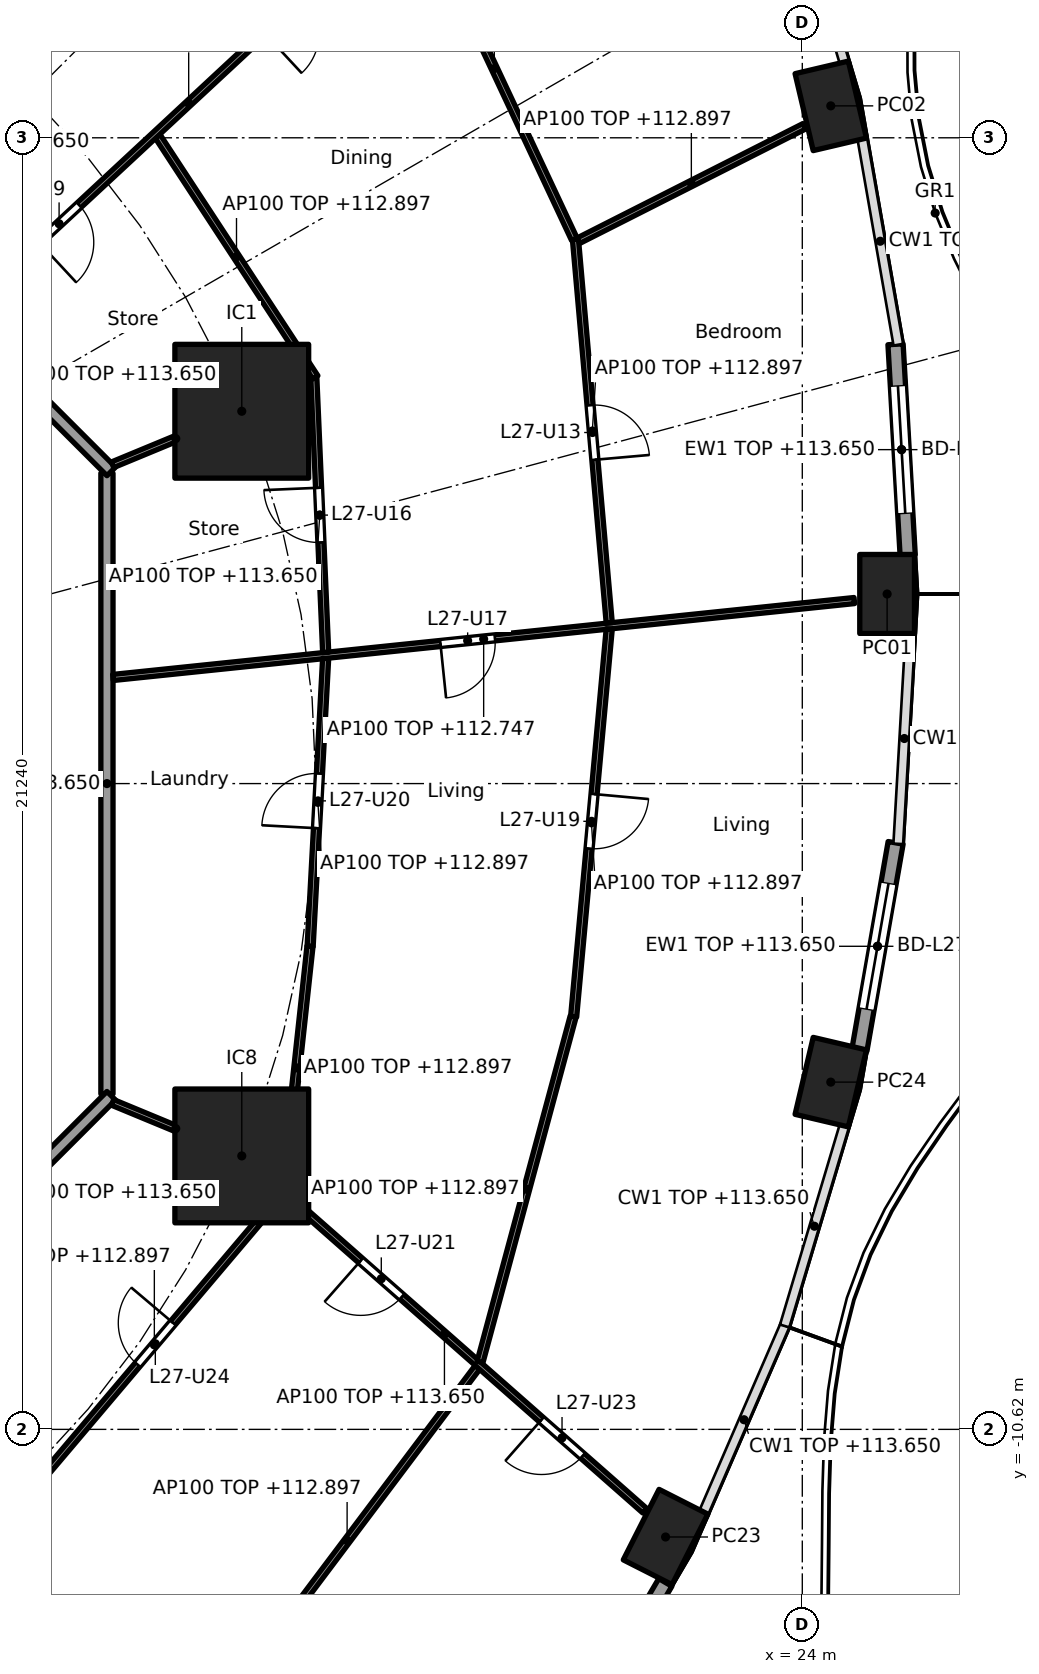
"""IFC4 building model, lengths in metres.
Left out: names, types, materials, properties, quantities, classifications, styles, units other than length and angle.
Written with IfcOpenShell. Run it as: python <this file> out.ifc"""

import sys

from ifc_helpers import new_model, si_unit, direction, frame, frame_2d, origin, origin_2d, place, context, subcontext, project, spatial, rectangle, hollow_rectangle, extrude, element, fill, save


model = new_model("IFC4")
c1 = context("Model", 3, precision=1e-05, world=origin(), true_north=direction((0.0, 1.0)))
c2 = subcontext(c1, "Body", "Model", "MODEL_VIEW")
j1 = project(units=[si_unit("LENGTHUNIT", "METRE"), si_unit("PLANEANGLEUNIT", "RADIAN")], contexts=[c1])
p1 = place(None, origin())
s1 = spatial("IfcSite", under=j1, at=p1, CompositionType="ELEMENT")
p2 = place(p1, origin())
s2 = spatial("IfcBuilding", under=s1, at=p2, CompositionType="ELEMENT")
p3 = place(p2, frame((0.0, 0.0, 110.3)))
s3 = spatial("IfcBuildingStorey", under=s2, at=p3, CompositionType="ELEMENT", Elevation=110.3)
for number, where, z_axis, x_axis in (
    (1, (25.395, 3.118, 0.0), (0.0, 0.0, 1.0), (0.0, 1.0, 0.0)),
    (2, (24.468, 11.145, 0.0), (0.0, 0.0, 1.0), (-0.229, 0.973, 0.0)),
    (3, (21.751, -12.39, 0.0), (0.0, 0.0, 1.0), (0.452, 0.892, 0.0)),
    (4, (24.468, -4.91, 0.0), (0.0, 0.0, 1.0), (0.229, 0.973, 0.0)),
):
    element("IfcColumn", number, at=place(p3, frame(where, z_axis=z_axis, x_axis=x_axis)), inside=s3, PredefinedType="COLUMN", context=c2, shape_type="SweptSolid", body=[
        extrude(hollow_rectangle(XDim=1.3, YDim=0.9, WallThickness=0.045, at=origin_2d()), origin(), (0.0, 0.0, 1.0), 3.7),
    ])
for number, where, z_axis, x_axis in (
    (5, (14.782, 6.123, 0.0), (0.0, 0.0, 1.0), (1.0, 0.0, 0.0)),
    (6, (14.782, -6.123, 0.0), (0.0, 0.0, 1.0), (1.0, 0.0, 0.0)),
):
    element("IfcColumn", number, at=place(p3, frame(where, z_axis=z_axis, x_axis=x_axis)), inside=s3, PredefinedType="COLUMN", context=c2, shape_type="SweptSolid", body=[
        extrude(rectangle(XDim=2.2, YDim=2.2, at=origin_2d()), origin(), (0.0, 0.0, 1.0), 3.7),
    ])
p4 = place(p3, frame((25.533, 7.224, 0.0), z_axis=(0.0, 0.0, 1.0), x_axis=(0.057546644052, -0.998342818754, 0.0)))
e7 = element("IfcWall", 7, at=p4, inside=s3, PredefinedType="SOLIDWALL", context=c2, shape_type="SweptSolid", body=[
    extrude(rectangle(XDim=3.47, YDim=0.25, at=frame_2d((1.735, 0.0))), origin(), (0.0, 0.0, 1.0), 3.35),
])
p5 = place(p4, frame((0.685, 0.0, 0.0)))
e8 = element("IfcOpeningElement", 8, at=p5, cuts=e7, PredefinedType="OPENING", context=c2, shape_type="SweptSolid", body=[
    extrude(rectangle(XDim=2.1, YDim=2.4, at=frame_2d((1.05, 1.2))), frame((0.0, 0.135, 0.0), z_axis=(0.0, -1.0, 0.0), x_axis=(1.0, 0.0, 0.0)), (0.0, 0.0, 1.0), 0.27),
])
p6 = place(p3, frame((21.748, -13.137, 0.0), z_axis=(0.0, 0.0, 1.0), x_axis=(-0.506297921217, -0.862358634775, 0.0)))
e9 = element("IfcWall", 9, at=p6, inside=s3, PredefinedType="SOLIDWALL", context=c2, shape_type="SweptSolid", body=[
    extrude(rectangle(XDim=3.325, YDim=0.25, at=frame_2d((1.662, 0.0))), origin(), (0.0, 0.0, 1.0), 3.35),
])
p7 = place(p6, frame((0.612, 0.0, 0.0)))
e10 = element("IfcOpeningElement", 10, at=p7, cuts=e9, PredefinedType="OPENING", context=c2, shape_type="SweptSolid", body=[
    extrude(rectangle(XDim=2.1, YDim=2.4, at=frame_2d((1.05, 1.2))), frame((0.0, 0.135, 0.0), z_axis=(0.0, -1.0, 0.0), x_axis=(1.0, 0.0, 0.0)), (0.0, 0.0, 1.0), 0.27),
])
p8 = place(p3, frame((25.535, -0.974, 0.0), z_axis=(0.0, 0.0, 1.0), x_axis=(-0.172164316671, -0.985068245385, 0.0)))
e11 = element("IfcWall", 11, at=p8, inside=s3, PredefinedType="SOLIDWALL", context=c2, shape_type="SweptSolid", body=[
    extrude(rectangle(XDim=3.454, YDim=0.25, at=frame_2d((1.727, 0.0))), origin(), (0.0, 0.0, 1.0), 3.35),
])
p9 = place(p8, frame((0.677, 0.0, 0.0)))
e12 = element("IfcOpeningElement", 12, at=p9, cuts=e11, PredefinedType="OPENING", context=c2, shape_type="SweptSolid", body=[
    extrude(rectangle(XDim=2.1, YDim=2.4, at=frame_2d((1.05, 1.2))), frame((0.0, 0.135, 0.0), z_axis=(0.0, -1.0, 0.0), x_axis=(1.0, 0.0, 0.0)), (0.0, 0.0, 1.0), 0.27),
])
p10 = place(p3, frame((12.565, -5.104, 0.0), z_axis=(0.0, 0.0, 1.0), x_axis=(0.0, 1.0, 0.0)))
e13 = element("IfcWall", 13, at=p10, inside=s3, PredefinedType="PARTITIONING", context=c2, shape_type="SweptSolid", body=[
    extrude(rectangle(XDim=10.209, YDim=0.2, at=frame_2d((5.104, 0.0))), origin(), (0.0, 0.0, 1.0), 3.35),
])
p11 = place(p3, frame((12.635, 5.134, 0.0), z_axis=(0.0, 0.0, 1.0), x_axis=(-0.707106781187, 0.707106781187, 0.0)))
e14 = element("IfcWall", 14, at=p11, inside=s3, PredefinedType="PARTITIONING", context=c2, shape_type="SweptSolid", body=[
    extrude(rectangle(XDim=10.609, YDim=0.2, at=frame_2d((5.305, 0.0))), origin(), (0.0, 0.0, 1.0), 3.35),
])
p12 = place(p11, frame((4.804, 0.0, 0.0)))
e15 = element("IfcOpeningElement", 15, at=p12, cuts=e14, PredefinedType="OPENING", context=c2, shape_type="SweptSolid", body=[
    extrude(rectangle(XDim=1.0, YDim=2.1, at=frame_2d((0.5, 1.05))), frame((0.0, 0.11, 0.0), z_axis=(0.0, -1.0, 0.0), x_axis=(1.0, 0.0, 0.0)), (0.0, 0.0, 1.0), 0.22),
])
p13 = place(p3, frame((5.275, -12.494, 0.0), z_axis=(0.0, 0.0, 1.0), x_axis=(0.707106781187, 0.707106781187, 0.0)))
e16 = element("IfcWall", 16, at=p13, inside=s3, PredefinedType="PARTITIONING", context=c2, shape_type="SweptSolid", body=[
    extrude(rectangle(XDim=10.409, YDim=0.2, at=frame_2d((5.205, 0.0))), origin(), (0.0, 0.0, 1.0), 3.35),
])
p14 = place(p3, frame((12.664, 1.745, 0.0), z_axis=(0.0, 0.0, 1.0), x_axis=(0.994662790212, 0.103179134358, 0.0)))
e17 = element("IfcWall", 17, at=p14, inside=s3, PredefinedType="PARTITIONING", context=c2, shape_type="SweptSolid", body=[
    extrude(rectangle(XDim=12.257, YDim=0.1, at=frame_2d((6.128, 0.0))), origin(), (0.0, 0.0, 1.0), 2.447),
])
p15 = place(p14, frame((5.414, 0.0, 0.0)))
e18 = element("IfcOpeningElement", 18, at=p15, cuts=e17, PredefinedType="OPENING", context=c2, shape_type="SweptSolid", body=[
    extrude(rectangle(XDim=0.9, YDim=2.1, at=frame_2d((0.45, 1.05))), frame((0.0, 0.06, 0.0), z_axis=(0.0, -1.0, 0.0), x_axis=(1.0, 0.0, 0.0)), (0.0, 0.0, 1.0), 0.12),
])
p16 = place(p3, frame((16.162, 2.158, 0.0), z_axis=(0.0, 0.0, 1.0), x_axis=(-0.043120653248, 0.999069872063, 0.0)))
e19 = element("IfcWall", 19, at=p16, inside=s3, PredefinedType="PARTITIONING", context=c2, shape_type="SweptSolid", body=[
    extrude(rectangle(XDim=4.518, YDim=0.1, at=frame_2d((2.259, 0.0))), origin(), (0.0, 0.0, 1.0), 3.35),
])
p17 = place(p16, frame((1.809, 0.0, 0.0)))
e20 = element("IfcOpeningElement", 20, at=p17, cuts=e19, PredefinedType="OPENING", context=c2, shape_type="SweptSolid", body=[
    extrude(rectangle(XDim=0.9, YDim=2.1, at=frame_2d((0.45, 1.05))), frame((0.0, 0.06, 0.0), z_axis=(0.0, -1.0, 0.0), x_axis=(1.0, 0.0, 0.0)), (0.0, 0.0, 1.0), 0.12),
])
p18 = place(p3, frame((16.161, 2.058, 0.0), z_axis=(0.0, 0.0, 1.0), x_axis=(-0.053696394729, -0.998557307916, 0.0)))
e21 = element("IfcWall", 21, at=p18, inside=s3, PredefinedType="PARTITIONING", context=c2, shape_type="SweptSolid", body=[
    extrude(rectangle(XDim=4.742, YDim=0.1, at=frame_2d((2.371, 0.0))), origin(), (0.0, 0.0, 1.0), 2.597),
])
p19 = place(p18, frame((1.896, 0.0, 0.0)))
e22 = element("IfcOpeningElement", 22, at=p19, cuts=e21, PredefinedType="OPENING", context=c2, shape_type="SweptSolid", body=[
    extrude(rectangle(XDim=0.9, YDim=2.1, at=frame_2d((0.45, 1.05))), frame((0.0, 0.06, 0.0), z_axis=(0.0, -1.0, 0.0), x_axis=(1.0, 0.0, 0.0)), (0.0, 0.0, 1.0), 0.12),
])
p20 = place(p3, frame((20.825, 2.642, 0.0), z_axis=(0.0, 0.0, 1.0), x_axis=(-0.08776338161, 0.996141349834, 0.0)))
e23 = element("IfcWall", 23, at=p20, inside=s3, PredefinedType="PARTITIONING", context=c2, shape_type="SweptSolid", body=[
    extrude(rectangle(XDim=6.337, YDim=0.1, at=frame_2d((3.168, 0.0))), origin(), (0.0, 0.0, 1.0), 2.597),
])
p21 = place(p20, frame((2.694, 0.0, 0.0)))
e24 = element("IfcOpeningElement", 24, at=p21, cuts=e23, PredefinedType="OPENING", context=c2, shape_type="SweptSolid", body=[
    extrude(rectangle(XDim=0.9, YDim=2.1, at=frame_2d((0.45, 1.05))), frame((0.0, 0.06, 0.0), z_axis=(0.0, -1.0, 0.0), x_axis=(1.0, 0.0, 0.0)), (0.0, 0.0, 1.0), 0.12),
])
p22 = place(p3, frame((20.825, 2.542, 0.0), z_axis=(0.0, 0.0, 1.0), x_axis=(-0.09140211812, -0.995814065377, 0.0)))
e25 = element("IfcWall", 25, at=p22, inside=s3, PredefinedType="PARTITIONING", context=c2, shape_type="SweptSolid", body=[
    extrude(rectangle(XDim=6.403, YDim=0.1, at=frame_2d((3.201, 0.0))), origin(), (0.0, 0.0, 1.0), 2.597),
])
p23 = place(p22, frame((2.726, 0.0, 0.0)))
e26 = element("IfcOpeningElement", 26, at=p23, cuts=e25, PredefinedType="OPENING", context=c2, shape_type="SweptSolid", body=[
    extrude(rectangle(XDim=0.9, YDim=2.1, at=frame_2d((0.45, 1.05))), frame((0.0, 0.06, 0.0), z_axis=(0.0, -1.0, 0.0), x_axis=(1.0, 0.0, 0.0)), (0.0, 0.0, 1.0), 0.12),
])
p24 = place(p3, frame((12.657, 5.243, 0.0), z_axis=(0.0, 0.0, 1.0), x_axis=(0.923864733477, 0.382719158442, 0.0)))
e27 = element("IfcWall", 27, at=p24, inside=s3, PredefinedType="PARTITIONING", context=c2, shape_type="SweptSolid", body=[
    extrude(rectangle(XDim=2.25, YDim=0.1, at=frame_2d((1.125, 0.0))), origin(), (0.0, 0.0, 1.0), 3.35),
])
p25 = place(p3, frame((15.992, 6.68, 0.0), z_axis=(0.0, 0.0, 1.0), x_axis=(-0.547472878942, 0.836823426311, 0.0)))
e28 = element("IfcWall", 28, at=p25, inside=s3, PredefinedType="PARTITIONING", context=c2, shape_type="SweptSolid", body=[
    extrude(rectangle(XDim=4.738, YDim=0.1, at=frame_2d((2.369, 0.0))), origin(), (0.0, 0.0, 1.0), 2.597),
])
p26 = place(p3, frame((20.318, 8.927, 0.0), z_axis=(0.0, 0.0, 1.0), x_axis=(0.892057836959, 0.451921249246, 0.0)))
e29 = element("IfcWall", 29, at=p26, inside=s3, PredefinedType="PARTITIONING", context=c2, shape_type="SweptSolid", body=[
    extrude(rectangle(XDim=4.164, YDim=0.1, at=frame_2d((2.082, 0.0))), origin(), (0.0, 0.0, 1.0), 2.597),
])
p27 = place(p3, frame((20.252, 8.95, 0.0), z_axis=(0.0, 0.0, 1.0), x_axis=(-0.424580052627, 0.90539040138, 0.0)))
e30 = element("IfcWall", 30, at=p27, inside=s3, PredefinedType="PARTITIONING", context=c2, shape_type="SweptSolid", body=[
    extrude(rectangle(XDim=6.204, YDim=0.1, at=frame_2d((3.102, 0.0))), origin(), (0.0, 0.0, 1.0), 2.597),
])
p28 = place(p3, frame((10.185, 7.726, 0.0), z_axis=(0.0, 0.0, 1.0), x_axis=(0.732598472978, 0.680661059112, 0.0)))
e31 = element("IfcWall", 31, at=p28, inside=s3, PredefinedType="PARTITIONING", context=c2, shape_type="SweptSolid", body=[
    extrude(rectangle(XDim=10.167, YDim=0.1, at=frame_2d((5.084, 0.0))), origin(), (0.0, 0.0, 1.0), 2.447),
])
p29 = place(p28, frame((1.725, 0.0, 0.0)))
e32 = element("IfcOpeningElement", 32, at=p29, cuts=e31, PredefinedType="OPENING", context=c2, shape_type="SweptSolid", body=[
    extrude(rectangle(XDim=0.9, YDim=2.1, at=frame_2d((0.45, 1.05))), frame((0.0, 0.06, 0.0), z_axis=(0.0, -1.0, 0.0), x_axis=(1.0, 0.0, 0.0)), (0.0, 0.0, 1.0), 0.12),
])
p30 = place(p28, frame((6.784, 0.0, 0.0)))
e33 = element("IfcOpeningElement", 33, at=p30, cuts=e31, PredefinedType="OPENING", context=c2, shape_type="SweptSolid", body=[
    extrude(rectangle(XDim=0.9, YDim=2.1, at=frame_2d((0.45, 1.05))), frame((0.0, 0.06, 0.0), z_axis=(0.0, -1.0, 0.0), x_axis=(1.0, 0.0, 0.0)), (0.0, 0.0, 1.0), 0.12),
])
p31 = place(p3, frame((7.713, 10.195, 0.0), z_axis=(0.0, 0.0, 1.0), x_axis=(0.552111071171, 0.833770571015, 0.0)))
e34 = element("IfcWall", 34, at=p31, inside=s3, PredefinedType="PARTITIONING", context=c2, shape_type="SweptSolid", body=[
    extrude(rectangle(XDim=17.208, YDim=0.1, at=frame_2d((8.604, 0.0))), origin(), (0.0, 0.0, 1.0), 2.447),
])
p32 = place(p31, frame((1.976, 0.0, 0.0)))
e35 = element("IfcOpeningElement", 35, at=p32, cuts=e34, PredefinedType="OPENING", context=c2, shape_type="SweptSolid", body=[
    extrude(rectangle(XDim=0.9, YDim=2.1, at=frame_2d((0.45, 1.05))), frame((0.0, 0.06, 0.0), z_axis=(0.0, -1.0, 0.0), x_axis=(1.0, 0.0, 0.0)), (0.0, 0.0, 1.0), 0.12),
])
p33 = place(p31, frame((7.611, 0.0, 0.0)))
e36 = element("IfcOpeningElement", 36, at=p33, cuts=e34, PredefinedType="OPENING", context=c2, shape_type="SweptSolid", body=[
    extrude(rectangle(XDim=0.9, YDim=2.1, at=frame_2d((0.45, 1.05))), frame((0.0, 0.06, 0.0), z_axis=(0.0, -1.0, 0.0), x_axis=(1.0, 0.0, 0.0)), (0.0, 0.0, 1.0), 0.12),
])
p34 = place(p31, frame((13.79, 0.0, 0.0)))
e37 = element("IfcOpeningElement", 37, at=p34, cuts=e34, PredefinedType="OPENING", context=c2, shape_type="SweptSolid", body=[
    extrude(rectangle(XDim=0.9, YDim=2.1, at=frame_2d((0.45, 1.05))), frame((0.0, 0.06, 0.0), z_axis=(0.0, -1.0, 0.0), x_axis=(1.0, 0.0, 0.0)), (0.0, 0.0, 1.0), 0.12),
])
p35 = place(p3, frame((11.255, -11.699, 0.0), z_axis=(0.0, 0.0, 1.0), x_axis=(0.64610637779, 0.763247370503, 0.0)))
e38 = element("IfcWall", 38, at=p35, inside=s3, PredefinedType="PARTITIONING", context=c2, shape_type="SweptSolid", body=[
    extrude(rectangle(XDim=6.467, YDim=0.1, at=frame_2d((3.233, 0.0))), origin(), (0.0, 0.0, 1.0), 2.597),
])
p36 = place(p35, frame((2.809, 0.0, 0.0)))
e39 = element("IfcOpeningElement", 39, at=p36, cuts=e38, PredefinedType="OPENING", context=c2, shape_type="SweptSolid", body=[
    extrude(rectangle(XDim=0.9, YDim=2.1, at=frame_2d((0.45, 1.05))), frame((0.0, 0.06, 0.0), z_axis=(0.0, -1.0, 0.0), x_axis=(1.0, 0.0, 0.0)), (0.0, 0.0, 1.0), 0.12),
])
p37 = place(p3, frame((14.372, -15.3, 0.0), z_axis=(0.0, 0.0, 1.0), x_axis=(0.600996629562, 0.79925155693, 0.0)))
e40 = element("IfcWall", 40, at=p37, inside=s3, PredefinedType="PARTITIONING", context=c2, shape_type="SweptSolid", body=[
    extrude(rectangle(XDim=7.13, YDim=0.1, at=frame_2d((3.565, 0.0))), origin(), (0.0, 0.0, 1.0), 2.597),
])
p38 = place(p3, frame((12.657, -5.243, 0.0), z_axis=(0.0, 0.0, 1.0), x_axis=(0.923848837015, -0.382757529444, 0.0)))
e41 = element("IfcWall", 41, at=p38, inside=s3, PredefinedType="PARTITIONING", context=c2, shape_type="SweptSolid", body=[
    extrude(rectangle(XDim=2.25, YDim=0.1, at=frame_2d((1.125, 0.0))), origin(), (0.0, 0.0, 1.0), 3.35),
])
p39 = place(p3, frame((14.82, -6.156, 0.0), z_axis=(0.0, 0.0, 1.0), x_axis=(0.750582231659, -0.660777052808, 0.0)))
e42 = element("IfcWall", 42, at=p39, inside=s3, PredefinedType="PARTITIONING", context=c2, shape_type="SweptSolid", body=[
    extrude(rectangle(XDim=8.781, YDim=0.1, at=frame_2d((4.391, 0.0))), origin(), (0.0, 0.0, 1.0), 3.35),
])
p40 = place(p39, frame((2.557, 0.0, 0.0)))
e43 = element("IfcOpeningElement", 43, at=p40, cuts=e42, PredefinedType="OPENING", context=c2, shape_type="SweptSolid", body=[
    extrude(rectangle(XDim=0.9, YDim=2.1, at=frame_2d((0.45, 1.05))), frame((0.0, 0.06, 0.0), z_axis=(0.0, -1.0, 0.0), x_axis=(1.0, 0.0, 0.0)), (0.0, 0.0, 1.0), 0.12),
])
p41 = place(p39, frame((6.517, 0.0, 0.0)))
e44 = element("IfcOpeningElement", 44, at=p41, cuts=e42, PredefinedType="OPENING", context=c2, shape_type="SweptSolid", body=[
    extrude(rectangle(XDim=0.9, YDim=2.1, at=frame_2d((0.45, 1.05))), frame((0.0, 0.06, 0.0), z_axis=(0.0, -1.0, 0.0), x_axis=(1.0, 0.0, 0.0)), (0.0, 0.0, 1.0), 0.12),
])
p42 = place(p3, frame((15.471, -6.675, 0.0), z_axis=(0.0, 0.0, 1.0), x_axis=(0.107572661837, 0.994197225114, 0.0)))
e45 = element("IfcWall", 45, at=p42, inside=s3, PredefinedType="PARTITIONING", context=c2, shape_type="SweptSolid", body=[
    extrude(rectangle(XDim=4.022, YDim=0.1, at=frame_2d((2.011, 0.0))), origin(), (0.0, 0.0, 1.0), 2.597),
])
p43 = place(p3, frame((18.7, -9.512, 0.0), z_axis=(0.0, 0.0, 1.0), x_axis=(0.260265138035, 0.965537186194, 0.0)))
e46 = element("IfcWall", 46, at=p43, inside=s3, PredefinedType="PARTITIONING", context=c2, shape_type="SweptSolid", body=[
    extrude(rectangle(XDim=5.884, YDim=0.1, at=frame_2d((2.942, 0.0))), origin(), (0.0, 0.0, 1.0), 2.597),
])
p44 = place(p5, origin())
e47 = element("IfcDoor", 47, at=p44, inside=s3, OperationType="SLIDING_TO_LEFT", PredefinedType="DOOR", context=c2, shape_type="SweptSolid", body=[
    extrude(rectangle(XDim=2.1, YDim=2.4, at=frame_2d((1.05, 1.2))), frame((0.0, 0.025, 0.0), z_axis=(0.0, -1.0, 0.0), x_axis=(1.0, 0.0, 0.0)), (0.0, 0.0, 1.0), 0.05),
])
fill(e8, e47)
p45 = place(p9, origin())
e48 = element("IfcDoor", 48, at=p45, inside=s3, OperationType="SLIDING_TO_LEFT", PredefinedType="DOOR", context=c2, shape_type="SweptSolid", body=[
    extrude(rectangle(XDim=2.1, YDim=2.4, at=frame_2d((1.05, 1.2))), frame((0.0, 0.025, 0.0), z_axis=(0.0, -1.0, 0.0), x_axis=(1.0, 0.0, 0.0)), (0.0, 0.0, 1.0), 0.05),
])
fill(e12, e48)
p46 = place(p29, frame((0.9, 0.0, 0.0), x_axis=(-1.0, 0.0, 0.0)))
e49 = element("IfcDoor", 49, at=p46, inside=s3, OperationType="SINGLE_SWING_RIGHT", PredefinedType="DOOR", context=c2, shape_type="SweptSolid", body=[
    extrude(rectangle(XDim=0.9, YDim=2.1, at=frame_2d((0.45, 1.05))), frame((0.0, 0.025, 0.0), z_axis=(0.0, -1.0, 0.0), x_axis=(1.0, 0.0, 0.0)), (0.0, 0.0, 1.0), 0.05),
])
fill(e32, e49)
p47 = place(p21, frame((0.9, 0.0, 0.0), x_axis=(-1.0, 0.0, 0.0)))
e50 = element("IfcDoor", 50, at=p47, inside=s3, OperationType="SINGLE_SWING_RIGHT", PredefinedType="DOOR", context=c2, shape_type="SweptSolid", body=[
    extrude(rectangle(XDim=0.9, YDim=2.1, at=frame_2d((0.45, 1.05))), frame((0.0, 0.025, 0.0), z_axis=(0.0, -1.0, 0.0), x_axis=(1.0, 0.0, 0.0)), (0.0, 0.0, 1.0), 0.05),
])
fill(e24, e50)
p48 = place(p17, origin())
e51 = element("IfcDoor", 51, at=p48, inside=s3, OperationType="SINGLE_SWING_RIGHT", PredefinedType="DOOR", context=c2, shape_type="SweptSolid", body=[
    extrude(rectangle(XDim=0.9, YDim=2.1, at=frame_2d((0.45, 1.05))), frame((0.0, 0.025, 0.0), z_axis=(0.0, -1.0, 0.0), x_axis=(1.0, 0.0, 0.0)), (0.0, 0.0, 1.0), 0.05),
])
fill(e20, e51)
p49 = place(p15, frame((0.9, 0.0, 0.0), x_axis=(-1.0, 0.0, 0.0)))
e52 = element("IfcDoor", 52, at=p49, inside=s3, OperationType="SINGLE_SWING_RIGHT", PredefinedType="DOOR", context=c2, shape_type="SweptSolid", body=[
    extrude(rectangle(XDim=0.9, YDim=2.1, at=frame_2d((0.45, 1.05))), frame((0.0, 0.025, 0.0), z_axis=(0.0, -1.0, 0.0), x_axis=(1.0, 0.0, 0.0)), (0.0, 0.0, 1.0), 0.05),
])
fill(e18, e52)
p50 = place(p23, origin())
e53 = element("IfcDoor", 53, at=p50, inside=s3, OperationType="SINGLE_SWING_LEFT", PredefinedType="DOOR", context=c2, shape_type="SweptSolid", body=[
    extrude(rectangle(XDim=0.9, YDim=2.1, at=frame_2d((0.45, 1.05))), frame((0.0, 0.025, 0.0), z_axis=(0.0, -1.0, 0.0), x_axis=(1.0, 0.0, 0.0)), (0.0, 0.0, 1.0), 0.05),
])
fill(e26, e53)
p51 = place(p19, frame((0.9, 0.0, 0.0), x_axis=(-1.0, 0.0, 0.0)))
e54 = element("IfcDoor", 54, at=p51, inside=s3, OperationType="SINGLE_SWING_LEFT", PredefinedType="DOOR", context=c2, shape_type="SweptSolid", body=[
    extrude(rectangle(XDim=0.9, YDim=2.1, at=frame_2d((0.45, 1.05))), frame((0.0, 0.025, 0.0), z_axis=(0.0, -1.0, 0.0), x_axis=(1.0, 0.0, 0.0)), (0.0, 0.0, 1.0), 0.05),
])
fill(e22, e54)
p52 = place(p40, frame((0.9, 0.0, 0.0), x_axis=(-1.0, 0.0, 0.0)))
e55 = element("IfcDoor", 55, at=p52, inside=s3, OperationType="SINGLE_SWING_RIGHT", PredefinedType="DOOR", context=c2, shape_type="SweptSolid", body=[
    extrude(rectangle(XDim=0.9, YDim=2.1, at=frame_2d((0.45, 1.05))), frame((0.0, 0.025, 0.0), z_axis=(0.0, -1.0, 0.0), x_axis=(1.0, 0.0, 0.0)), (0.0, 0.0, 1.0), 0.05),
])
fill(e43, e55)
p53 = place(p41, frame((0.9, 0.0, 0.0), x_axis=(-1.0, 0.0, 0.0)))
e56 = element("IfcDoor", 56, at=p53, inside=s3, OperationType="SINGLE_SWING_RIGHT", PredefinedType="DOOR", context=c2, shape_type="SweptSolid", body=[
    extrude(rectangle(XDim=0.9, YDim=2.1, at=frame_2d((0.45, 1.05))), frame((0.0, 0.025, 0.0), z_axis=(0.0, -1.0, 0.0), x_axis=(1.0, 0.0, 0.0)), (0.0, 0.0, 1.0), 0.05),
])
fill(e44, e56)
p54 = place(p36, origin())
e57 = element("IfcDoor", 57, at=p54, inside=s3, OperationType="SINGLE_SWING_RIGHT", PredefinedType="DOOR", context=c2, shape_type="SweptSolid", body=[
    extrude(rectangle(XDim=0.9, YDim=2.1, at=frame_2d((0.45, 1.05))), frame((0.0, 0.025, 0.0), z_axis=(0.0, -1.0, 0.0), x_axis=(1.0, 0.0, 0.0)), (0.0, 0.0, 1.0), 0.05),
])
fill(e39, e57)
save(model, sys.argv[1])
